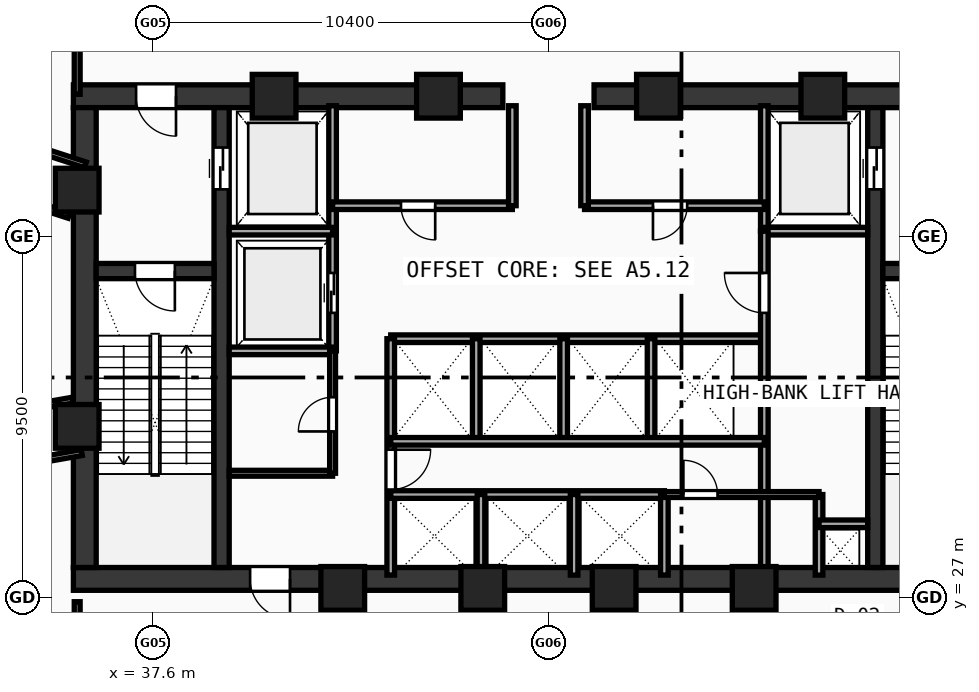
"""IFC4 building model, lengths in metres.
Left out: names, types, materials, properties, quantities, classifications, styles, units other than length and angle.
Written with IfcOpenShell. Run it as: python <this file> out.ifc"""

import sys

from ifc_helpers import new_model, si_unit, direction, frame, frame_2d, origin, origin_with_axes, origin_2d, place, context, subcontext, project, spatial, rectangle, hollow_rectangle, extrude, source, transform, mapped, element, fill, save


model = new_model("IFC4")
c1 = context("Model", 3, precision=1e-05, world=origin(), true_north=direction((0.0, 1.0)))
c2 = subcontext(c1, "Body", "Model", "MODEL_VIEW")
j1 = project(units=[si_unit("LENGTHUNIT", "METRE"), si_unit("PLANEANGLEUNIT", "RADIAN")], contexts=[c1])
p1 = place(None, origin())
s1 = spatial("IfcSite", under=j1, at=p1, CompositionType="ELEMENT")
p2 = place(p1, origin())
s2 = spatial("IfcBuilding", under=s1, at=p2, CompositionType="ELEMENT")
p3 = place(p2, frame((0.0, 0.0, 176.16)))
s3 = spatial("IfcBuildingStorey", under=s2, at=p3, CompositionType="ELEMENT", Elevation=176.16)
p4 = place(p3, frame((35.5, 27.5, 0.0), z_axis=(0.0, 0.0, 1.0), x_axis=(1.0, 0.0, 0.0)))
e1 = element("IfcWall", 1, at=p4, inside=s3, PredefinedType="SHEAR", context=c2, shape_type="SweptSolid", body=[
    extrude(rectangle(XDim=25.0, YDim=0.6, at=frame_2d((12.5, 0.0))), origin(), (0.0, 0.0, 1.0), 4.54),
])
p5 = place(p4, frame((4.65, 0.0, 0.0)))
e2 = element("IfcOpeningElement", 2, at=p5, cuts=e1, PredefinedType="OPENING", context=c2, shape_type="SweptSolid", body=[
    extrude(rectangle(XDim=1.05, YDim=2.1, at=frame_2d((0.525, 1.05))), frame((0.0, 0.31, 0.0), z_axis=(0.0, -1.0, 0.0), x_axis=(1.0, 0.0, 0.0)), (0.0, 0.0, 1.0), 0.62),
])
p6 = place(p3, frame((35.5, 40.2, 0.0), z_axis=(0.0, 0.0, 1.0), x_axis=(1.0, 0.0, 0.0)))
e3 = element("IfcWall", 3, at=p6, inside=s3, PredefinedType="SHEAR", context=c2, shape_type="SweptSolid", body=[
    extrude(rectangle(XDim=11.3, YDim=0.6, at=frame_2d((5.65, 0.0))), origin(), (0.0, 0.0, 1.0), 4.54),
])
p7 = place(p6, frame((1.65, 0.0, 0.0)))
e4 = element("IfcOpeningElement", 4, at=p7, cuts=e3, PredefinedType="OPENING", context=c2, shape_type="SweptSolid", body=[
    extrude(rectangle(XDim=1.05, YDim=2.1, at=frame_2d((0.525, 1.05))), frame((0.0, 0.31, 0.0), z_axis=(0.0, -1.0, 0.0), x_axis=(1.0, 0.0, 0.0)), (0.0, 0.0, 1.0), 0.62),
])
p8 = place(p3, frame((49.2, 40.2, 0.0), z_axis=(0.0, 0.0, 1.0), x_axis=(1.0, 0.0, 0.0)))
e5 = element("IfcWall", 5, at=p8, inside=s3, PredefinedType="SHEAR", context=c2, shape_type="SweptSolid", body=[
    extrude(rectangle(XDim=11.3, YDim=0.6, at=frame_2d((5.65, 0.0))), origin(), (0.0, 0.0, 1.0), 4.54),
])
p9 = place(p8, frame((8.6, 0.0, 0.0)))
e6 = element("IfcOpeningElement", 6, at=p9, cuts=e5, PredefinedType="OPENING", context=c2, shape_type="SweptSolid", body=[
    extrude(rectangle(XDim=1.05, YDim=2.1, at=frame_2d((0.525, 1.05))), frame((0.0, 0.31, 0.0), z_axis=(0.0, -1.0, 0.0), x_axis=(1.0, 0.0, 0.0)), (0.0, 0.0, 1.0), 0.62),
])
p10 = place(p3, frame((35.8, 27.8, 0.0), z_axis=(0.0, 0.0, 1.0), x_axis=(0.0, 1.0, 0.0)))
e7 = element("IfcWall", 7, at=p10, inside=s3, PredefinedType="SHEAR", context=c2, shape_type="SweptSolid", body=[
    extrude(rectangle(XDim=12.1, YDim=0.6, at=frame_2d((6.05, 0.0))), origin(), (0.0, 0.0, 1.0), 4.54),
])
p11 = place(p3, frame((39.4, 27.8, 0.0), z_axis=(0.0, 0.0, 1.0), x_axis=(0.0, 1.0, 0.0)))
e8 = element("IfcWall", 8, at=p11, inside=s3, PredefinedType="SHEAR", context=c2, shape_type="SweptSolid", body=[
    extrude(rectangle(XDim=12.1, YDim=0.4, at=frame_2d((6.05, 0.0))), origin(), (0.0, 0.0, 1.0), 4.54),
])
p12 = place(p11, frame((9.95, 0.0, 0.0)))
e9 = element("IfcOpeningElement", 9, at=p12, cuts=e8, PredefinedType="OPENING", context=c2, shape_type="SweptSolid", body=[
    extrude(rectangle(XDim=1.1, YDim=2.1, at=frame_2d((0.55, 1.05))), frame((0.0, 0.21, 0.0), z_axis=(0.0, -1.0, 0.0), x_axis=(1.0, 0.0, 0.0)), (0.0, 0.0, 1.0), 0.42),
])
p13 = place(p3, frame((56.6, 27.8, 0.0), z_axis=(0.0, 0.0, 1.0), x_axis=(0.0, 1.0, 0.0)))
e10 = element("IfcWall", 10, at=p13, inside=s3, PredefinedType="SHEAR", context=c2, shape_type="SweptSolid", body=[
    extrude(rectangle(XDim=12.1, YDim=0.4, at=frame_2d((6.05, 0.0))), origin(), (0.0, 0.0, 1.0), 4.54),
])
p14 = place(p13, frame((9.95, 0.0, 0.0)))
e11 = element("IfcOpeningElement", 11, at=p14, cuts=e10, PredefinedType="OPENING", context=c2, shape_type="SweptSolid", body=[
    extrude(rectangle(XDim=1.1, YDim=2.1, at=frame_2d((0.55, 1.05))), frame((0.0, 0.21, 0.0), z_axis=(0.0, -1.0, 0.0), x_axis=(1.0, 0.0, 0.0)), (0.0, 0.0, 1.0), 0.42),
])
p15 = place(p3, frame((36.1, 35.6, 0.0), z_axis=(0.0, 0.0, 1.0), x_axis=(1.0, 0.0, 0.0)))
e12 = element("IfcWall", 12, at=p15, inside=s3, PredefinedType="SHEAR", context=c2, shape_type="SweptSolid", body=[
    extrude(rectangle(XDim=3.1, YDim=0.4, at=frame_2d((1.55, 0.0))), origin(), (0.0, 0.0, 1.0), 4.54),
])
p16 = place(p15, frame((1.02, 0.0, 0.0)))
e13 = element("IfcOpeningElement", 13, at=p16, cuts=e12, PredefinedType="OPENING", context=c2, shape_type="SweptSolid", body=[
    extrude(rectangle(XDim=1.05, YDim=2.1, at=frame_2d((0.525, 1.05))), frame((0.0, 0.21, 0.0), z_axis=(0.0, -1.0, 0.0), x_axis=(1.0, 0.0, 0.0)), (0.0, 0.0, 1.0), 0.42),
])
p17 = place(p3, frame((56.8, 35.6, 0.0), z_axis=(0.0, 0.0, 1.0), x_axis=(1.0, 0.0, 0.0)))
e14 = element("IfcWall", 14, at=p17, inside=s3, PredefinedType="SHEAR", context=c2, shape_type="SweptSolid", body=[
    extrude(rectangle(XDim=3.1, YDim=0.4, at=frame_2d((1.55, 0.0))), origin(), (0.0, 0.0, 1.0), 4.54),
])
p18 = place(p17, frame((1.02, 0.0, 0.0)))
e15 = element("IfcOpeningElement", 15, at=p18, cuts=e14, PredefinedType="OPENING", context=c2, shape_type="SweptSolid", body=[
    extrude(rectangle(XDim=1.05, YDim=2.1, at=frame_2d((0.525, 1.05))), frame((0.0, 0.21, 0.0), z_axis=(0.0, -1.0, 0.0), x_axis=(1.0, 0.0, 0.0)), (0.0, 0.0, 1.0), 0.42),
])
m1 = source(origin(), c2, "Body", "SweptSolid", [
    extrude(hollow_rectangle(XDim=1.15, YDim=1.15, WallThickness=0.048, at=origin_2d()), origin(), (0.0, 0.0, 1.0), 4.82),
])
for number, where, z_axis, x_axis in (
    (16, (42.588, 27.25, -0.28), (0.0, 0.0, 1.0), (1.0, 0.0, 0.0)),
    (17, (46.272, 27.25, -0.28), (0.0, 0.0, 1.0), (1.0, 0.0, 0.0)),
    (18, (49.729, 27.25, -0.28), (0.0, 0.0, 1.0), (1.0, 0.0, 0.0)),
    (19, (53.412, 27.25, -0.28), (0.0, 0.0, 1.0), (1.0, 0.0, 0.0)),
    (20, (55.219, 40.2, -0.28), (0.0, 0.0, 1.0), (1.0, 0.0, 0.0)),
    (21, (50.894, 40.2, -0.28), (0.0, 0.0, 1.0), (1.0, 0.0, 0.0)),
    (22, (45.106, 40.2, -0.28), (0.0, 0.0, 1.0), (1.0, 0.0, 0.0)),
    (23, (40.781, 40.2, -0.28), (0.0, 0.0, 1.0), (1.0, 0.0, 0.0)),
    (24, (35.6, 37.729, -0.28), (0.0, 0.0, 1.0), (1.0, 0.0, 0.0)),
    (25, (35.6, 31.513, -0.28), (0.0, 0.0, 1.0), (1.0, 0.0, 0.0)),
):
    element("IfcColumn", number, at=place(p3, frame(where, z_axis=z_axis, x_axis=x_axis)), inside=s3, PredefinedType="COLUMN", context=c2, shape_type="MappedRepresentation", body=[
        mapped(m1, transform((0.0, 0.0, 0.0), scale=1.0)),
    ])
p19 = place(p3, frame((42.32, 33.5, 0.0), z_axis=(0.0, 0.0, 1.0), x_axis=(0.0, 1.0, 0.0)))
e26 = element("IfcWall", 26, at=p19, inside=s3, PredefinedType="SOLIDWALL", context=c2, shape_type="SweptSolid", body=[
    extrude(rectangle(XDim=6.45, YDim=0.2, at=frame_2d((3.225, 0.0))), origin(), (0.0, 0.0, 1.0), 4.54),
])
p20 = place(p19, frame((1.0, 0.0, 0.0)))
e27 = element("IfcOpeningElement", 27, at=p20, cuts=e26, PredefinedType="OPENING", context=c2, shape_type="SweptSolid", body=[
    extrude(rectangle(XDim=1.05, YDim=2.1, at=frame_2d((0.525, 1.05))), frame((0.0, 0.11, 0.0), z_axis=(0.0, -1.0, 0.0), x_axis=(1.0, 0.0, 0.0)), (0.0, 0.0, 1.0), 0.22),
])
for number, where, z_axis, x_axis in (
    (28, (39.6, 36.65, 0.0), (0.0, 0.0, 1.0), (1.0, 0.0, 0.0)),
    (29, (39.6, 33.5, 0.0), (0.0, 0.0, 1.0), (1.0, 0.0, 0.0)),
):
    element("IfcWall", number, at=place(p3, frame(where, z_axis=z_axis, x_axis=x_axis)), inside=s3, PredefinedType="SOLIDWALL", context=c2, shape_type="SweptSolid", body=[
        extrude(rectangle(XDim=2.72, YDim=0.2, at=frame_2d((1.36, 0.0))), origin(), (0.0, 0.0, 1.0), 4.54),
    ])
p21 = place(p3, frame((53.68, 36.65, 0.0), z_axis=(0.0, 0.0, 1.0), x_axis=(0.0, 1.0, 0.0)))
e30 = element("IfcWall", 30, at=p21, inside=s3, PredefinedType="SOLIDWALL", context=c2, shape_type="SweptSolid", body=[
    extrude(rectangle(XDim=3.3, YDim=0.2, at=frame_2d((1.65, 0.0))), origin(), (0.0, 0.0, 1.0), 4.54),
])
p22 = place(p3, frame((53.68, 36.65, 0.0), z_axis=(0.0, 0.0, 1.0), x_axis=(1.0, 0.0, 0.0)))
e31 = element("IfcWall", 31, at=p22, inside=s3, PredefinedType="SOLIDWALL", context=c2, shape_type="SweptSolid", body=[
    extrude(rectangle(XDim=2.72, YDim=0.2, at=frame_2d((1.36, 0.0))), origin(), (0.0, 0.0, 1.0), 4.54),
])
p23 = place(p3, frame((42.32, 37.32, 0.0), z_axis=(0.0, 0.0, 1.0), x_axis=(1.0, 0.0, 0.0)))
e32 = element("IfcWall", 32, at=p23, inside=s3, PredefinedType="SOLIDWALL", context=c2, shape_type="SweptSolid", body=[
    extrude(rectangle(XDim=4.73, YDim=0.2, at=frame_2d((2.365, 0.0))), origin(), (0.0, 0.0, 1.0), 4.54),
])
p24 = place(p23, frame((1.8, 0.0, 0.0)))
e33 = element("IfcOpeningElement", 33, at=p24, cuts=e32, PredefinedType="OPENING", context=c2, shape_type="SweptSolid", body=[
    extrude(rectangle(XDim=0.9, YDim=2.1, at=frame_2d((0.45, 1.05))), frame((0.0, 0.11, 0.0), z_axis=(0.0, -1.0, 0.0), x_axis=(1.0, 0.0, 0.0)), (0.0, 0.0, 1.0), 0.22),
])
p25 = place(p3, frame((48.95, 37.32, 0.0), z_axis=(0.0, 0.0, 1.0), x_axis=(1.0, 0.0, 0.0)))
e34 = element("IfcWall", 34, at=p25, inside=s3, PredefinedType="SOLIDWALL", context=c2, shape_type="SweptSolid", body=[
    extrude(rectangle(XDim=4.73, YDim=0.2, at=frame_2d((2.365, 0.0))), origin(), (0.0, 0.0, 1.0), 4.54),
])
p26 = place(p25, frame((1.8, 0.0, 0.0)))
e35 = element("IfcOpeningElement", 35, at=p26, cuts=e34, PredefinedType="OPENING", context=c2, shape_type="SweptSolid", body=[
    extrude(rectangle(XDim=0.9, YDim=2.1, at=frame_2d((0.45, 1.05))), frame((0.0, 0.11, 0.0), z_axis=(0.0, -1.0, 0.0), x_axis=(1.0, 0.0, 0.0)), (0.0, 0.0, 1.0), 0.22),
])
for number, where, z_axis, x_axis in (
    (36, (47.05, 37.32, 0.0), (0.0, 0.0, 1.0), (0.0, 1.0, 0.0)),
    (37, (48.95, 37.32, 0.0), (0.0, 0.0, 1.0), (0.0, 1.0, 0.0)),
):
    element("IfcWall", number, at=place(p3, frame(where, z_axis=z_axis, x_axis=x_axis)), inside=s3, PredefinedType="SOLIDWALL", context=c2, shape_type="SweptSolid", body=[
        extrude(rectangle(XDim=2.63, YDim=0.2, at=frame_2d((1.315, 0.0))), origin(), (0.0, 0.0, 1.0), 4.54),
    ])
p27 = place(p3, frame((43.85, 33.82, 0.0), z_axis=(0.0, 0.0, 1.0), x_axis=(1.0, 0.0, 0.0)))
e38 = element("IfcWall", 38, at=p27, inside=s3, PredefinedType="SOLIDWALL", context=c2, shape_type="SweptSolid", body=[
    extrude(rectangle(XDim=9.83, YDim=0.2, at=frame_2d((4.915, 0.0))), origin(), (0.0, 0.0, 1.0), 4.54),
])
p28 = place(p3, frame((43.85, 27.6, 0.0), z_axis=(0.0, 0.0, 1.0), x_axis=(0.0, 1.0, 0.0)))
e39 = element("IfcWall", 39, at=p28, inside=s3, PredefinedType="SOLIDWALL", context=c2, shape_type="SweptSolid", body=[
    extrude(rectangle(XDim=6.22, YDim=0.2, at=frame_2d((3.11, 0.0))), origin(), (0.0, 0.0, 1.0), 4.54),
])
p29 = place(p28, frame((2.25, 0.0, 0.0)))
e40 = element("IfcOpeningElement", 40, at=p29, cuts=e39, PredefinedType="OPENING", context=c2, shape_type="SweptSolid", body=[
    extrude(rectangle(XDim=1.05, YDim=2.1, at=frame_2d((0.525, 1.05))), frame((0.0, 0.11, 0.0), z_axis=(0.0, -1.0, 0.0), x_axis=(1.0, 0.0, 0.0)), (0.0, 0.0, 1.0), 0.22),
])
p30 = place(p3, frame((53.68, 27.6, 0.0), z_axis=(0.0, 0.0, 1.0), x_axis=(0.0, 1.0, 0.0)))
e41 = element("IfcWall", 41, at=p30, inside=s3, PredefinedType="SOLIDWALL", context=c2, shape_type="SweptSolid", body=[
    extrude(rectangle(XDim=9.05, YDim=0.2, at=frame_2d((4.525, 0.0))), origin(), (0.0, 0.0, 1.0), 4.54),
])
p31 = place(p30, frame((6.9, 0.0, 0.0)))
e42 = element("IfcOpeningElement", 42, at=p31, cuts=e41, PredefinedType="OPENING", context=c2, shape_type="SweptSolid", body=[
    extrude(rectangle(XDim=1.05, YDim=2.1, at=frame_2d((0.525, 1.05))), frame((0.0, 0.11, 0.0), z_axis=(0.0, -1.0, 0.0), x_axis=(1.0, 0.0, 0.0)), (0.0, 0.0, 1.0), 0.22),
])
for number, where, z_axis, x_axis in (
    (43, (46.1, 31.12, 0.0), (0.0, 0.0, 1.0), (0.0, 1.0, 0.0)),
    (44, (48.4, 31.12, 0.0), (0.0, 0.0, 1.0), (0.0, 1.0, 0.0)),
    (45, (50.7, 31.12, 0.0), (0.0, 0.0, 1.0), (0.0, 1.0, 0.0)),
):
    element("IfcWall", number, at=place(p3, frame(where, z_axis=z_axis, x_axis=x_axis)), inside=s3, PredefinedType="SOLIDWALL", context=c2, shape_type="SweptSolid", body=[
        extrude(rectangle(XDim=2.7, YDim=0.2, at=frame_2d((1.35, 0.0))), origin(), (0.0, 0.0, 1.0), 4.54),
    ])
p32 = place(p3, frame((43.85, 29.72, 0.0), z_axis=(0.0, 0.0, 1.0), x_axis=(1.0, 0.0, 0.0)))
e46 = element("IfcWall", 46, at=p32, inside=s3, PredefinedType="SOLIDWALL", context=c2, shape_type="SweptSolid", body=[
    extrude(rectangle(XDim=7.2, YDim=0.2, at=frame_2d((3.6, 0.0))), origin(), (0.0, 0.0, 1.0), 4.54),
])
p33 = place(p3, frame((51.05, 27.6, 0.0), z_axis=(0.0, 0.0, 1.0), x_axis=(0.0, 1.0, 0.0)))
e47 = element("IfcWall", 47, at=p33, inside=s3, PredefinedType="SOLIDWALL", context=c2, shape_type="SweptSolid", body=[
    extrude(rectangle(XDim=2.12, YDim=0.2, at=frame_2d((1.06, 0.0))), origin(), (0.0, 0.0, 1.0), 4.54),
])
p34 = place(p3, frame((43.85, 31.12, 0.0), z_axis=(0.0, 0.0, 1.0), x_axis=(1.0, 0.0, 0.0)))
e48 = element("IfcWall", 48, at=p34, inside=s3, PredefinedType="SOLIDWALL", context=c2, shape_type="SweptSolid", body=[
    extrude(rectangle(XDim=9.83, YDim=0.2, at=frame_2d((4.915, 0.0))), origin(), (0.0, 0.0, 1.0), 4.54),
])
for number, where, z_axis, x_axis in (
    (49, (46.225, 27.6, 0.0), (0.0, 0.0, 1.0), (0.0, 1.0, 0.0)),
    (50, (48.675, 27.6, 0.0), (0.0, 0.0, 1.0), (0.0, 1.0, 0.0)),
    (51, (55.12, 27.6, 0.0), (0.0, 0.0, 1.0), (0.0, 1.0, 0.0)),
):
    element("IfcWall", number, at=place(p3, frame(where, z_axis=z_axis, x_axis=x_axis)), inside=s3, PredefinedType="SOLIDWALL", context=c2, shape_type="SweptSolid", body=[
        extrude(rectangle(XDim=2.12, YDim=0.2, at=frame_2d((1.06, 0.0))), origin(), (0.0, 0.0, 1.0), 4.54),
    ])
p35 = place(p3, frame((55.12, 28.95, 0.0), z_axis=(0.0, 0.0, 1.0), x_axis=(1.0, 0.0, 0.0)))
e52 = element("IfcWall", 52, at=p35, inside=s3, PredefinedType="SOLIDWALL", context=c2, shape_type="SweptSolid", body=[
    extrude(rectangle(XDim=1.28, YDim=0.2, at=frame_2d((0.64, 0.0))), origin(), (0.0, 0.0, 1.0), 4.54),
])
p36 = place(p3, frame((39.6, 30.28, 0.0), z_axis=(0.0, 0.0, 1.0), x_axis=(1.0, 0.0, 0.0)))
e53 = element("IfcWall", 53, at=p36, inside=s3, PredefinedType="PARTITIONING", context=c2, shape_type="SweptSolid", body=[
    extrude(rectangle(XDim=2.72, YDim=0.155, at=frame_2d((1.36, 0.0))), origin(), (0.0, 0.0, 1.0), 4.54),
])
p37 = place(p3, frame((42.32, 30.28, 0.0), z_axis=(0.0, 0.0, 1.0), x_axis=(0.0, 1.0, 0.0)))
e54 = element("IfcWall", 54, at=p37, inside=s3, PredefinedType="PARTITIONING", context=c2, shape_type="SweptSolid", body=[
    extrude(rectangle(XDim=3.22, YDim=0.155, at=frame_2d((1.61, 0.0))), origin(), (0.0, 0.0, 1.0), 4.54),
])
p38 = place(p37, frame((1.1, 0.0, 0.0)))
e55 = element("IfcOpeningElement", 55, at=p38, cuts=e54, PredefinedType="OPENING", context=c2, shape_type="SweptSolid", body=[
    extrude(rectangle(XDim=0.9, YDim=2.1, at=frame_2d((0.45, 1.05))), frame((0.0, 0.087, 0.0), z_axis=(0.0, -1.0, 0.0), x_axis=(1.0, 0.0, 0.0)), (0.0, 0.0, 1.0), 0.175),
])
p39 = place(p3, frame((51.05, 29.72, 0.0), z_axis=(0.0, 0.0, 1.0), x_axis=(1.0, 0.0, 0.0)))
e56 = element("IfcWall", 56, at=p39, inside=s3, PredefinedType="PARTITIONING", context=c2, shape_type="SweptSolid", body=[
    extrude(rectangle(XDim=4.07, YDim=0.155, at=frame_2d((2.035, 0.0))), origin(), (0.0, 0.0, 1.0), 4.54),
])
p40 = place(p39, frame((0.5, 0.0, 0.0)))
e57 = element("IfcOpeningElement", 57, at=p40, cuts=e56, PredefinedType="OPENING", context=c2, shape_type="SweptSolid", body=[
    extrude(rectangle(XDim=0.9, YDim=2.1, at=frame_2d((0.45, 1.05))), frame((0.0, 0.087, 0.0), z_axis=(0.0, -1.0, 0.0), x_axis=(1.0, 0.0, 0.0)), (0.0, 0.0, 1.0), 0.175),
])
p41 = place(p3, frame((35.816, 38.395, 0.0), z_axis=(0.0, 0.0, 1.0), x_axis=(-0.951055361724, 0.309020547758, 0.0)))
e58 = element("IfcWall", 58, at=p41, inside=s3, PredefinedType="PARTITIONING", context=c2, shape_type="SweptSolid", body=[
    extrude(rectangle(XDim=18.956, YDim=0.155, at=frame_2d((9.478, 0.0))), origin(), (0.0, 0.0, 1.0), 3.89),
])
p42 = place(p3, frame((35.384, 37.063, 0.0), z_axis=(0.0, 0.0, 1.0), x_axis=(-0.951056691926, 0.309016453838, 0.0)))
e59 = element("IfcWall", 59, at=p42, inside=s3, PredefinedType="PARTITIONING", context=c2, shape_type="SweptSolid", body=[
    extrude(rectangle(XDim=19.19, YDim=0.155, at=frame_2d((9.595, 0.0))), origin(), (0.0, 0.0, 1.0), 3.89),
])
p43 = place(p3, frame((35.479, 32.203, 0.0), z_axis=(0.0, 0.0, 1.0), x_axis=(-0.984809178547, -0.173640092865, 0.0)))
e60 = element("IfcWall", 60, at=p43, inside=s3, PredefinedType="PARTITIONING", context=c2, shape_type="SweptSolid", body=[
    extrude(rectangle(XDim=25.124, YDim=0.155, at=frame_2d((12.562, 0.0))), origin(), (0.0, 0.0, 1.0), 3.89),
])
p44 = place(p3, frame((35.722, 30.824, 0.0), z_axis=(0.0, 0.0, 1.0), x_axis=(-0.984808792437, -0.173642282695, 0.0)))
e61 = element("IfcWall", 61, at=p44, inside=s3, PredefinedType="PARTITIONING", context=c2, shape_type="SweptSolid", body=[
    extrude(rectangle(XDim=25.996, YDim=0.155, at=frame_2d((12.998, 0.0))), origin(), (0.0, 0.0, 1.0), 3.89),
])
p45 = place(p3, frame((35.6, 40.25, 0.0), z_axis=(0.0, 0.0, 1.0), x_axis=(0.0, 1.0, 0.0)))
e62 = element("IfcWall", 62, at=p45, inside=s3, PredefinedType="PARTITIONING", context=c2, shape_type="SweptSolid", body=[
    extrude(rectangle(XDim=2.55, YDim=0.155, at=frame_2d((1.275, 0.0))), origin(), (0.0, 0.0, 1.0), 4.54),
])
p46 = place(p3, frame((35.6, 24.9, 0.0), z_axis=(0.0, 0.0, 1.0), x_axis=(0.0, 1.0, 0.0)))
e63 = element("IfcWall", 63, at=p46, inside=s3, PredefinedType="PARTITIONING", context=c2, shape_type="SweptSolid", body=[
    extrude(rectangle(XDim=2.0, YDim=0.155, at=frame_2d((1.0, 0.0))), origin(), (0.0, 0.0, 1.0), 4.14),
])
m2 = source(origin(), c2, "Body", "SweptSolid", [
    extrude(rectangle(XDim=1.05, YDim=2.1, at=frame_2d((0.525, 1.05))), frame((0.0, 0.025, 0.0), z_axis=(0.0, -1.0, 0.0), x_axis=(1.0, 0.0, 0.0)), (0.0, 0.0, 1.0), 0.05),
])
p47 = place(p16, frame((1.05, 0.0, 0.0), z_axis=(0.0, 0.0, 1.0), x_axis=(-1.0, 0.0, 0.0)))
e64 = element("IfcDoor", 64, at=p47, inside=s3, OperationType="SINGLE_SWING_LEFT", PredefinedType="DOOR", context=c2, shape_type="MappedRepresentation", body=[
    mapped(m2, transform((0.0, 0.0, 0.0), scale=1.0)),
])
fill(e13, e64)
p48 = place(p7, frame((1.05, 0.0, 0.0), z_axis=(0.0, 0.0, 1.0), x_axis=(-1.0, 0.0, 0.0)))
e65 = element("IfcDoor", 65, at=p48, inside=s3, OperationType="SINGLE_SWING_LEFT", PredefinedType="DOOR", context=c2, shape_type="MappedRepresentation", body=[
    mapped(m2, transform((0.0, 0.0, 0.0), scale=1.0)),
])
fill(e4, e65)
p49 = place(p5, frame((1.05, 0.0, 0.0), z_axis=(0.0, 0.0, 1.0), x_axis=(-1.0, 0.0, 0.0)))
e66 = element("IfcDoor", 66, at=p49, inside=s3, OperationType="SINGLE_SWING_LEFT", PredefinedType="DOOR", context=c2, shape_type="MappedRepresentation", body=[
    mapped(m2, transform((0.0, 0.0, 0.0), scale=1.0)),
])
fill(e2, e66)
m3 = source(origin(), c2, "Body", "SweptSolid", [
    extrude(rectangle(XDim=1.1, YDim=2.1, at=frame_2d((0.55, 1.05))), frame((0.0, 0.025, 0.0), z_axis=(0.0, -1.0, 0.0), x_axis=(1.0, 0.0, 0.0)), (0.0, 0.0, 1.0), 0.05),
])
p50 = place(p12, frame((1.1, 0.0, 0.0), z_axis=(0.0, 0.0, 1.0), x_axis=(-1.0, 0.0, 0.0)))
e67 = element("IfcDoor", 67, at=p50, inside=s3, OperationType="DOUBLE_DOOR_SLIDING", PredefinedType="DOOR", context=c2, shape_type="MappedRepresentation", body=[
    mapped(m3, transform((0.0, 0.0, 0.0), scale=1.0)),
])
fill(e9, e67)
p51 = place(p14, origin_with_axes())
e68 = element("IfcDoor", 68, at=p51, inside=s3, OperationType="DOUBLE_DOOR_SLIDING", PredefinedType="DOOR", context=c2, shape_type="MappedRepresentation", body=[
    mapped(m3, transform((0.0, 0.0, 0.0), scale=1.0)),
])
fill(e11, e68)
p52 = place(p20, origin_with_axes())
e69 = element("IfcDoor", 69, at=p52, inside=s3, OperationType="DOUBLE_DOOR_SLIDING", PredefinedType="DOOR", context=c2, shape_type="MappedRepresentation", body=[
    mapped(m2, transform((0.0, 0.0, 0.0), scale=1.0)),
])
fill(e27, e69)
m4 = source(origin(), c2, "Body", "SweptSolid", [
    extrude(rectangle(XDim=0.9, YDim=2.1, at=frame_2d((0.45, 1.05))), frame((0.0, 0.025, 0.0), z_axis=(0.0, -1.0, 0.0), x_axis=(1.0, 0.0, 0.0)), (0.0, 0.0, 1.0), 0.05),
])
p53 = place(p24, frame((0.9, 0.0, 0.0), z_axis=(0.0, 0.0, 1.0), x_axis=(-1.0, 0.0, 0.0)))
e70 = element("IfcDoor", 70, at=p53, inside=s3, OperationType="SINGLE_SWING_LEFT", PredefinedType="DOOR", context=c2, shape_type="MappedRepresentation", body=[
    mapped(m4, transform((0.0, 0.0, 0.0), scale=1.0)),
])
fill(e33, e70)
p54 = place(p26, frame((0.9, 0.0, 0.0), z_axis=(0.0, 0.0, 1.0), x_axis=(-1.0, 0.0, 0.0)))
e71 = element("IfcDoor", 71, at=p54, inside=s3, OperationType="SINGLE_SWING_RIGHT", PredefinedType="DOOR", context=c2, shape_type="MappedRepresentation", body=[
    mapped(m4, transform((0.0, 0.0, 0.0), scale=1.0)),
])
fill(e35, e71)
p55 = place(p29, frame((1.05, 0.0, 0.0), z_axis=(0.0, 0.0, 1.0), x_axis=(-1.0, 0.0, 0.0)))
e72 = element("IfcDoor", 72, at=p55, inside=s3, OperationType="SINGLE_SWING_LEFT", PredefinedType="DOOR", context=c2, shape_type="MappedRepresentation", body=[
    mapped(m2, transform((0.0, 0.0, 0.0), scale=1.0)),
])
fill(e40, e72)
p56 = place(p31, origin_with_axes())
e73 = element("IfcDoor", 73, at=p56, inside=s3, OperationType="SINGLE_SWING_RIGHT", PredefinedType="DOOR", context=c2, shape_type="MappedRepresentation", body=[
    mapped(m2, transform((0.0, 0.0, 0.0), scale=1.0)),
])
fill(e42, e73)
p57 = place(p38, origin_with_axes())
e74 = element("IfcDoor", 74, at=p57, inside=s3, OperationType="SINGLE_SWING_LEFT", PredefinedType="DOOR", context=c2, shape_type="MappedRepresentation", body=[
    mapped(m4, transform((0.0, 0.0, 0.0), scale=1.0)),
])
fill(e55, e74)
p58 = place(p40, origin_with_axes())
e75 = element("IfcDoor", 75, at=p58, inside=s3, OperationType="SINGLE_SWING_LEFT", PredefinedType="DOOR", context=c2, shape_type="MappedRepresentation", body=[
    mapped(m4, transform((0.0, 0.0, 0.0), scale=1.0)),
])
fill(e57, e75)
save(model, sys.argv[1])
